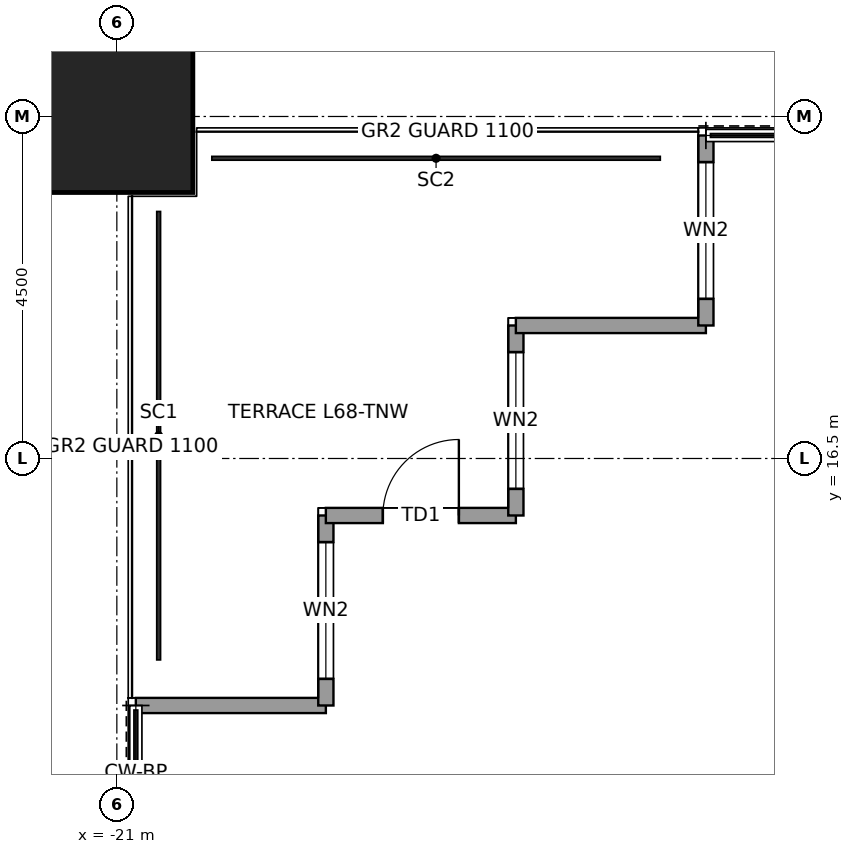
"""IFC4 building model, lengths in metres.
Left out: names, types, materials, properties, quantities, classifications, styles, units other than length and angle.
Written with IfcOpenShell. Run it as: python <this file> out.ifc"""

import sys

from ifc_helpers import new_model, si_unit, direction, frame, frame_2d, origin, origin_2d, place, context, subcontext, project, spatial, rectangle, hollow_rectangle, extrude, element, fill, save


model = new_model("IFC4")
c1 = context("Model", 3, precision=1e-05, world=origin(), true_north=direction((0.0, 1.0)))
c2 = subcontext(c1, "Body", "Model", "MODEL_VIEW")
j1 = project(units=[si_unit("LENGTHUNIT", "METRE"), si_unit("PLANEANGLEUNIT", "RADIAN")], contexts=[c1])
p1 = place(None, origin())
s1 = spatial("IfcSite", under=j1, at=p1, CompositionType="ELEMENT")
p2 = place(p1, origin())
s2 = spatial("IfcBuilding", under=s1, at=p2, CompositionType="ELEMENT")
p3 = place(p2, frame((0.0, 0.0, 307.9)))
s3 = spatial("IfcBuildingStorey", under=s2, at=p3, CompositionType="ELEMENT", Elevation=307.9)
p4 = place(p3, frame((-21.0, 21.0, 0.0), z_axis=(0.0, 0.0, 1.0), x_axis=(1.0, 0.0, 0.0)))
e1 = element("IfcColumn", 1, at=p4, inside=s3, PredefinedType="COLUMN", context=c2, shape_type="SweptSolid", body=[
    extrude(hollow_rectangle(XDim=2.0, YDim=2.0, WallThickness=0.095, at=origin_2d()), origin(), (0.0, 0.0, 1.0), 4.0),
])
p5 = place(p3, frame((-20.75, 13.25, 0.0), z_axis=(0.0, 0.0, 1.0), x_axis=(1.0, 0.0, 0.0)))
e2 = element("IfcWall", 2, at=p5, inside=s3, PredefinedType="SOLIDWALL", context=c2, shape_type="SweptSolid", body=[
    extrude(rectangle(XDim=2.5, YDim=0.2, at=frame_2d((1.25, 0.0))), origin(), (0.0, 0.0, 1.0), 3.85),
])
p6 = place(p3, frame((-18.25, 13.25, 0.0), z_axis=(0.0, 0.0, 1.0), x_axis=(0.0, 1.0, 0.0)))
e3 = element("IfcWall", 3, at=p6, inside=s3, PredefinedType="SOLIDWALL", context=c2, shape_type="SweptSolid", body=[
    extrude(rectangle(XDim=2.5, YDim=0.2, at=frame_2d((1.25, 0.0))), origin(), (0.0, 0.0, 1.0), 3.85),
])
p7 = place(p6, frame((0.35, 0.0, 0.3)))
e4 = element("IfcOpeningElement", 4, at=p7, cuts=e3, PredefinedType="OPENING", context=c2, shape_type="SweptSolid", body=[
    extrude(rectangle(XDim=1.8, YDim=2.4, at=frame_2d((0.9, 1.2))), frame((0.0, 0.11, 0.0), z_axis=(0.0, -1.0, 0.0), x_axis=(1.0, 0.0, 0.0)), (0.0, 0.0, 1.0), 0.22),
])
p8 = place(p3, frame((-18.25, 15.75, 0.0), z_axis=(0.0, 0.0, 1.0), x_axis=(1.0, 0.0, 0.0)))
e5 = element("IfcWall", 5, at=p8, inside=s3, PredefinedType="SOLIDWALL", context=c2, shape_type="SweptSolid", body=[
    extrude(rectangle(XDim=2.5, YDim=0.2, at=frame_2d((1.25, 0.0))), origin(), (0.0, 0.0, 1.0), 3.317),
])
p9 = place(p8, frame((0.75, 0.0, 0.0)))
e6 = element("IfcOpeningElement", 6, at=p9, cuts=e5, PredefinedType="OPENING", context=c2, shape_type="SweptSolid", body=[
    extrude(rectangle(XDim=1.0, YDim=2.4, at=frame_2d((0.5, 1.2))), frame((0.0, 0.11, 0.0), z_axis=(0.0, -1.0, 0.0), x_axis=(1.0, 0.0, 0.0)), (0.0, 0.0, 1.0), 0.22),
])
p10 = place(p3, frame((-15.75, 15.75, 0.0), z_axis=(0.0, 0.0, 1.0), x_axis=(0.0, 1.0, 0.0)))
e7 = element("IfcWall", 7, at=p10, inside=s3, PredefinedType="SOLIDWALL", context=c2, shape_type="SweptSolid", body=[
    extrude(rectangle(XDim=2.5, YDim=0.2, at=frame_2d((1.25, 0.0))), origin(), (0.0, 0.0, 1.0), 3.85),
])
p11 = place(p10, frame((0.35, 0.0, 0.3)))
e8 = element("IfcOpeningElement", 8, at=p11, cuts=e7, PredefinedType="OPENING", context=c2, shape_type="SweptSolid", body=[
    extrude(rectangle(XDim=1.8, YDim=2.4, at=frame_2d((0.9, 1.2))), frame((0.0, 0.11, 0.0), z_axis=(0.0, -1.0, 0.0), x_axis=(1.0, 0.0, 0.0)), (0.0, 0.0, 1.0), 0.22),
])
p12 = place(p3, frame((-15.75, 18.25, 0.0), z_axis=(0.0, 0.0, 1.0), x_axis=(1.0, 0.0, 0.0)))
e9 = element("IfcWall", 9, at=p12, inside=s3, PredefinedType="SOLIDWALL", context=c2, shape_type="SweptSolid", body=[
    extrude(rectangle(XDim=2.5, YDim=0.2, at=frame_2d((1.25, 0.0))), origin(), (0.0, 0.0, 1.0), 3.85),
])
p13 = place(p3, frame((-13.25, 18.25, 0.0), z_axis=(0.0, 0.0, 1.0), x_axis=(0.0, 1.0, 0.0)))
e10 = element("IfcWall", 10, at=p13, inside=s3, PredefinedType="SOLIDWALL", context=c2, shape_type="SweptSolid", body=[
    extrude(rectangle(XDim=2.5, YDim=0.2, at=frame_2d((1.25, 0.0))), origin(), (0.0, 0.0, 1.0), 3.85),
])
p14 = place(p13, frame((0.35, 0.0, 0.3)))
e11 = element("IfcOpeningElement", 11, at=p14, cuts=e10, PredefinedType="OPENING", context=c2, shape_type="SweptSolid", body=[
    extrude(rectangle(XDim=1.8, YDim=2.4, at=frame_2d((0.9, 1.2))), frame((0.0, 0.11, 0.0), z_axis=(0.0, -1.0, 0.0), x_axis=(1.0, 0.0, 0.0)), (0.0, 0.0, 1.0), 0.22),
])
p15 = place(p7, origin())
e12 = element("IfcWindow", 12, at=p15, inside=s3, PartitioningType="SINGLE_PANEL", PredefinedType="WINDOW", context=c2, shape_type="SweptSolid", body=[
    extrude(rectangle(XDim=1.8, YDim=2.4, at=frame_2d((0.9, 1.2))), frame((0.0, 0.03, 0.0), z_axis=(0.0, -1.0, 0.0), x_axis=(1.0, 0.0, 0.0)), (0.0, 0.0, 1.0), 0.06),
])
fill(e4, e12)
p16 = place(p9, origin())
e13 = element("IfcDoor", 13, at=p16, inside=s3, OperationType="SINGLE_SWING_RIGHT", PredefinedType="DOOR", context=c2, shape_type="SweptSolid", body=[
    extrude(rectangle(XDim=1.0, YDim=2.4, at=frame_2d((0.5, 1.2))), frame((0.0, 0.025, 0.0), z_axis=(0.0, -1.0, 0.0), x_axis=(1.0, 0.0, 0.0)), (0.0, 0.0, 1.0), 0.05),
])
fill(e6, e13)
p17 = place(p11, origin())
e14 = element("IfcWindow", 14, at=p17, inside=s3, PartitioningType="SINGLE_PANEL", PredefinedType="WINDOW", context=c2, shape_type="SweptSolid", body=[
    extrude(rectangle(XDim=1.8, YDim=2.4, at=frame_2d((0.9, 1.2))), frame((0.0, 0.03, 0.0), z_axis=(0.0, -1.0, 0.0), x_axis=(1.0, 0.0, 0.0)), (0.0, 0.0, 1.0), 0.06),
])
fill(e8, e14)
p18 = place(p14, origin())
e15 = element("IfcWindow", 15, at=p18, inside=s3, PartitioningType="SINGLE_PANEL", PredefinedType="WINDOW", context=c2, shape_type="SweptSolid", body=[
    extrude(rectangle(XDim=1.8, YDim=2.4, at=frame_2d((0.9, 1.2))), frame((0.0, 0.03, 0.0), z_axis=(0.0, -1.0, 0.0), x_axis=(1.0, 0.0, 0.0)), (0.0, 0.0, 1.0), 0.06),
])
fill(e11, e15)
save(model, sys.argv[1])
